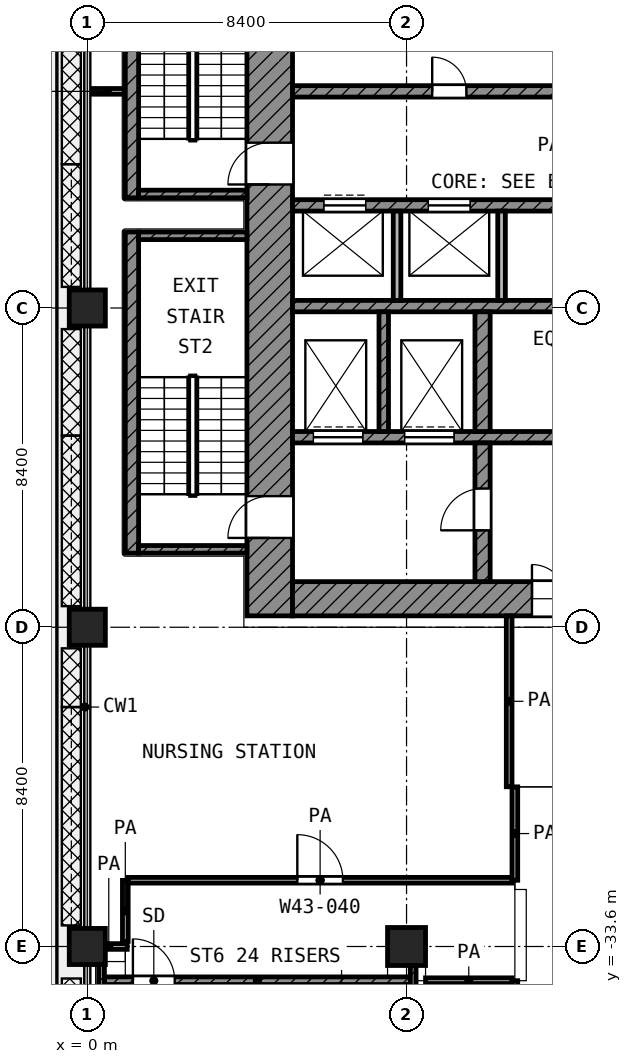
"""IFC4 building model, lengths in metres.
Left out: names, types, materials, properties, quantities, classifications, styles, units other than length and angle.
Written with IfcOpenShell. Run it as: python <this file> out.ifc"""

import sys

from ifc_helpers import new_model, si_unit, direction, frame, frame_2d, origin, origin_2d, place, context, subcontext, project, spatial, rectangle, extrude, element, fill, save


model = new_model("IFC4")
c1 = context("Model", 3, precision=1e-05, world=origin(), true_north=direction((0.0, 1.0)))
c2 = subcontext(c1, "Body", "Model", "MODEL_VIEW")
j1 = project(units=[si_unit("LENGTHUNIT", "METRE"), si_unit("PLANEANGLEUNIT", "RADIAN")], contexts=[c1])
p1 = place(None, origin())
s1 = spatial("IfcSite", under=j1, at=p1, CompositionType="ELEMENT")
p2 = place(p1, origin())
s2 = spatial("IfcBuilding", under=s1, at=p2, CompositionType="ELEMENT")
p3 = place(p2, frame((0.0, 0.0, 187.8)))
s3 = spatial("IfcBuildingStorey", under=s2, at=p3, CompositionType="ELEMENT", Elevation=187.8)
for number, where, z_axis, x_axis in (
    (1, (0.0, -16.8, 0.0), (0.0, 0.0, 1.0), (1.0, 0.0, 0.0)),
    (2, (0.0, -25.2, 0.0), (0.0, 0.0, 1.0), (1.0, 0.0, 0.0)),
    (3, (0.0, -33.6, 0.0), (0.0, 0.0, 1.0), (1.0, 0.0, 0.0)),
):
    element("IfcColumn", number, at=place(p3, frame(where, z_axis=z_axis, x_axis=x_axis)), inside=s3, PredefinedType="COLUMN", context=c2, shape_type="SweptSolid", body=[
        extrude(rectangle(XDim=0.95, YDim=0.95, at=origin_2d()), origin(), (0.0, 0.0, 1.0), 4.2),
    ])
p4 = place(p3, frame((8.4, -33.6, 0.0), z_axis=(0.0, 0.0, 1.0), x_axis=(1.0, 0.0, 0.0)))
e4 = element("IfcColumn", 4, at=p4, inside=s3, PredefinedType="COLUMN", context=c2, shape_type="SweptSolid", body=[
    extrude(rectangle(XDim=1.0, YDim=1.0, at=origin_2d()), origin(), (0.0, 0.0, 1.0), 4.2),
])
p5 = place(p3, frame((4.8, -24.9, 0.0), z_axis=(0.0, 0.0, 1.0), x_axis=(0.0, 1.0, 0.0)))
e5 = element("IfcWall", 5, at=p5, inside=s3, PredefinedType="SHEAR", context=c2, shape_type="SweptSolid", body=[
    extrude(rectangle(XDim=19.5, YDim=1.2, at=frame_2d((9.75, 0.0))), origin(), (0.0, 0.0, 1.0), 3.6),
])
p6 = place(p5, frame((11.35, 0.0, 0.0)))
e6 = element("IfcOpeningElement", 6, at=p6, cuts=e5, PredefinedType="OPENING", context=c2, shape_type="SweptSolid", body=[
    extrude(rectangle(XDim=1.1, YDim=2.1, at=frame_2d((0.55, 1.05))), frame((0.0, 0.61, 0.0), z_axis=(0.0, -1.0, 0.0), x_axis=(1.0, 0.0, 0.0)), (0.0, 0.0, 1.0), 1.22),
])
p7 = place(p5, frame((2.05, 0.0, 0.0)))
e7 = element("IfcOpeningElement", 7, at=p7, cuts=e5, PredefinedType="OPENING", context=c2, shape_type="SweptSolid", body=[
    extrude(rectangle(XDim=1.1, YDim=2.1, at=frame_2d((0.55, 1.05))), frame((0.0, 0.61, 0.0), z_axis=(0.0, -1.0, 0.0), x_axis=(1.0, 0.0, 0.0)), (0.0, 0.0, 1.0), 1.22),
])
p8 = place(p3, frame((5.4, -24.45, 0.0), z_axis=(0.0, 0.0, 1.0), x_axis=(1.0, 0.0, 0.0)))
e8 = element("IfcWall", 8, at=p8, inside=s3, PredefinedType="SHEAR", context=c2, shape_type="SweptSolid", body=[
    extrude(rectangle(XDim=18.6, YDim=0.9, at=frame_2d((9.3, 0.0))), origin(), (0.0, 0.0, 1.0), 3.6),
])
p9 = place(p8, frame((6.3, 0.0, 0.0)))
e9 = element("IfcOpeningElement", 9, at=p9, cuts=e8, PredefinedType="OPENING", context=c2, shape_type="SweptSolid", body=[
    extrude(rectangle(XDim=1.8, YDim=2.1, at=frame_2d((0.9, 1.05))), frame((0.0, 0.46, 0.0), z_axis=(0.0, -1.0, 0.0), x_axis=(1.0, 0.0, 0.0)), (0.0, 0.0, 1.0), 0.92),
])
p10 = place(p3, frame((5.4, -11.1, 0.0), z_axis=(0.0, 0.0, 1.0), x_axis=(1.0, 0.0, 0.0)))
e10 = element("IfcWall", 10, at=p10, inside=s3, PredefinedType="SHEAR", context=c2, shape_type="SweptSolid", body=[
    extrude(rectangle(XDim=16.65, YDim=0.3, at=frame_2d((8.325, 0.0))), origin(), (0.0, 0.0, 1.0), 3.6),
])
p11 = place(p10, frame((11.825, 0.0, 0.0)))
e11 = element("IfcOpeningElement", 11, at=p11, cuts=e10, PredefinedType="OPENING", context=c2, shape_type="SweptSolid", body=[
    extrude(rectangle(XDim=1.1, YDim=2.1, at=frame_2d((0.55, 1.05))), frame((0.0, 0.16, 0.0), z_axis=(0.0, -1.0, 0.0), x_axis=(1.0, 0.0, 0.0)), (0.0, 0.0, 1.0), 0.32),
])
p12 = place(p10, frame((14.575, 0.0, 0.0)))
e12 = element("IfcOpeningElement", 12, at=p12, cuts=e10, PredefinedType="OPENING", context=c2, shape_type="SweptSolid", body=[
    extrude(rectangle(XDim=1.1, YDim=2.1, at=frame_2d((0.55, 1.05))), frame((0.0, 0.16, 0.0), z_axis=(0.0, -1.0, 0.0), x_axis=(1.0, 0.0, 0.0)), (0.0, 0.0, 1.0), 0.32),
])
p13 = place(p10, frame((3.675, 0.0, 0.0)))
e13 = element("IfcOpeningElement", 13, at=p13, cuts=e10, PredefinedType="OPENING", context=c2, shape_type="SweptSolid", body=[
    extrude(rectangle(XDim=0.9, YDim=2.1, at=frame_2d((0.45, 1.05))), frame((0.0, 0.16, 0.0), z_axis=(0.0, -1.0, 0.0), x_axis=(1.0, 0.0, 0.0)), (0.0, 0.0, 1.0), 0.32),
])
p14 = place(p10, frame((9.175, 0.0, 0.0)))
e14 = element("IfcOpeningElement", 14, at=p14, cuts=e10, PredefinedType="OPENING", context=c2, shape_type="SweptSolid", body=[
    extrude(rectangle(XDim=0.9, YDim=2.1, at=frame_2d((0.45, 1.05))), frame((0.0, 0.16, 0.0), z_axis=(0.0, -1.0, 0.0), x_axis=(1.0, 0.0, 0.0)), (0.0, 0.0, 1.0), 0.32),
])
p15 = place(p3, frame((5.4, -14.1, 0.0), z_axis=(0.0, 0.0, 1.0), x_axis=(1.0, 0.0, 0.0)))
e15 = element("IfcWall", 15, at=p15, inside=s3, PredefinedType="SHEAR", context=c2, shape_type="SweptSolid", body=[
    extrude(rectangle(XDim=16.65, YDim=0.3, at=frame_2d((8.325, 0.0))), origin(), (0.0, 0.0, 1.0), 3.6),
])
p16 = place(p15, frame((0.825, 0.0, 0.0)))
e16 = element("IfcOpeningElement", 16, at=p16, cuts=e15, PredefinedType="OPENING", context=c2, shape_type="SweptSolid", body=[
    extrude(rectangle(XDim=1.1, YDim=2.1, at=frame_2d((0.55, 1.05))), frame((0.0, 0.16, 0.0), z_axis=(0.0, -1.0, 0.0), x_axis=(1.0, 0.0, 0.0)), (0.0, 0.0, 1.0), 0.32),
])
p17 = place(p15, frame((3.575, 0.0, 0.0)))
e17 = element("IfcOpeningElement", 17, at=p17, cuts=e15, PredefinedType="OPENING", context=c2, shape_type="SweptSolid", body=[
    extrude(rectangle(XDim=1.1, YDim=2.1, at=frame_2d((0.55, 1.05))), frame((0.0, 0.16, 0.0), z_axis=(0.0, -1.0, 0.0), x_axis=(1.0, 0.0, 0.0)), (0.0, 0.0, 1.0), 0.32),
])
p18 = place(p3, frame((5.4, -16.75, 0.0), z_axis=(0.0, 0.0, 1.0), x_axis=(1.0, 0.0, 0.0)))
e18 = element("IfcWall", 18, at=p18, inside=s3, PredefinedType="SHEAR", context=c2, shape_type="SweptSolid", body=[
    extrude(rectangle(XDim=16.65, YDim=0.3, at=frame_2d((8.325, 0.0))), origin(), (0.0, 0.0, 1.0), 3.6),
])
p19 = place(p3, frame((5.4, -20.2, 0.0), z_axis=(0.0, 0.0, 1.0), x_axis=(1.0, 0.0, 0.0)))
e19 = element("IfcWall", 19, at=p19, inside=s3, PredefinedType="SHEAR", context=c2, shape_type="SweptSolid", body=[
    extrude(rectangle(XDim=14.65, YDim=0.3, at=frame_2d((7.325, 0.0))), origin(), (0.0, 0.0, 1.0), 3.6),
])
p20 = place(p19, frame((10.55, 0.0, 0.0)))
e20 = element("IfcOpeningElement", 20, at=p20, cuts=e19, PredefinedType="OPENING", context=c2, shape_type="SweptSolid", body=[
    extrude(rectangle(XDim=1.3, YDim=2.1, at=frame_2d((0.65, 1.05))), frame((0.0, 0.16, 0.0), z_axis=(0.0, -1.0, 0.0), x_axis=(1.0, 0.0, 0.0)), (0.0, 0.0, 1.0), 0.32),
])
p21 = place(p19, frame((12.95, 0.0, 0.0)))
e21 = element("IfcOpeningElement", 21, at=p21, cuts=e19, PredefinedType="OPENING", context=c2, shape_type="SweptSolid", body=[
    extrude(rectangle(XDim=1.3, YDim=2.1, at=frame_2d((0.65, 1.05))), frame((0.0, 0.16, 0.0), z_axis=(0.0, -1.0, 0.0), x_axis=(1.0, 0.0, 0.0)), (0.0, 0.0, 1.0), 0.32),
])
p22 = place(p19, frame((0.55, 0.0, 0.0)))
e22 = element("IfcOpeningElement", 22, at=p22, cuts=e19, PredefinedType="OPENING", context=c2, shape_type="SweptSolid", body=[
    extrude(rectangle(XDim=1.3, YDim=2.1, at=frame_2d((0.65, 1.05))), frame((0.0, 0.16, 0.0), z_axis=(0.0, -1.0, 0.0), x_axis=(1.0, 0.0, 0.0)), (0.0, 0.0, 1.0), 0.32),
])
p23 = place(p19, frame((2.95, 0.0, 0.0)))
e23 = element("IfcOpeningElement", 23, at=p23, cuts=e19, PredefinedType="OPENING", context=c2, shape_type="SweptSolid", body=[
    extrude(rectangle(XDim=1.3, YDim=2.1, at=frame_2d((0.65, 1.05))), frame((0.0, 0.16, 0.0), z_axis=(0.0, -1.0, 0.0), x_axis=(1.0, 0.0, 0.0)), (0.0, 0.0, 1.0), 0.32),
])
p24 = place(p19, frame((7.15, 0.0, 0.0)))
e24 = element("IfcOpeningElement", 24, at=p24, cuts=e19, PredefinedType="OPENING", context=c2, shape_type="SweptSolid", body=[
    extrude(rectangle(XDim=0.9, YDim=2.1, at=frame_2d((0.45, 1.05))), frame((0.0, 0.16, 0.0), z_axis=(0.0, -1.0, 0.0), x_axis=(1.0, 0.0, 0.0)), (0.0, 0.0, 1.0), 0.32),
])
p25 = place(p3, frame((10.4, -24.0, 0.0), z_axis=(0.0, 0.0, 1.0), x_axis=(0.0, 1.0, 0.0)))
e25 = element("IfcWall", 25, at=p25, inside=s3, PredefinedType="SHEAR", context=c2, shape_type="SweptSolid", body=[
    extrude(rectangle(XDim=3.65, YDim=0.4, at=frame_2d((1.825, 0.0))), origin(), (0.0, 0.0, 1.0), 3.6),
])
p26 = place(p25, frame((1.35, 0.0, 0.0)))
e26 = element("IfcOpeningElement", 26, at=p26, cuts=e25, PredefinedType="OPENING", context=c2, shape_type="SweptSolid", body=[
    extrude(rectangle(XDim=1.1, YDim=2.1, at=frame_2d((0.55, 1.05))), frame((0.0, 0.21, 0.0), z_axis=(0.0, -1.0, 0.0), x_axis=(1.0, 0.0, 0.0)), (0.0, 0.0, 1.0), 0.42),
])
p27 = place(p3, frame((10.4, -20.05, 0.0), z_axis=(0.0, 0.0, 1.0), x_axis=(0.0, 1.0, 0.0)))
e27 = element("IfcWall", 27, at=p27, inside=s3, PredefinedType="SHEAR", context=c2, shape_type="SweptSolid", body=[
    extrude(rectangle(XDim=3.15, YDim=0.4, at=frame_2d((1.575, 0.0))), origin(), (0.0, 0.0, 1.0), 3.6),
])
p28 = place(p3, frame((7.8, -20.05, 0.0), z_axis=(0.0, 0.0, 1.0), x_axis=(0.0, 1.0, 0.0)))
e28 = element("IfcWall", 28, at=p28, inside=s3, PredefinedType="SHEAR", context=c2, shape_type="SweptSolid", body=[
    extrude(rectangle(XDim=3.15, YDim=0.25, at=frame_2d((1.575, 0.0))), origin(), (0.0, 0.0, 1.0), 3.6),
])
for number, where, z_axis, x_axis in (
    (29, (8.15, -16.6, 0.0), (0.0, 0.0, 1.0), (0.0, 1.0, 0.0)),
    (30, (10.9, -16.6, 0.0), (0.0, 0.0, 1.0), (0.0, 1.0, 0.0)),
):
    element("IfcWall", number, at=place(p3, frame(where, z_axis=z_axis, x_axis=x_axis)), inside=s3, PredefinedType="PARTITIONING", context=c2, shape_type="SweptSolid", body=[
        extrude(rectangle(XDim=2.35, YDim=0.2, at=frame_2d((1.175, 0.0))), origin(), (0.0, 0.0, 1.0), 3.6),
    ])
p29 = place(p3, frame((1.175, -13.9, 0.0), z_axis=(0.0, 0.0, 1.0), x_axis=(0.0, 1.0, 0.0)))
e31 = element("IfcWall", 31, at=p29, inside=s3, PredefinedType="SHEAR", context=c2, shape_type="SweptSolid", body=[
    extrude(rectangle(XDim=8.45, YDim=0.35, at=frame_2d((4.225, 0.0))), origin(), (0.0, 0.0, 1.0), 3.6),
])
p30 = place(p3, frame((1.35, -13.8, 0.0), z_axis=(0.0, 0.0, 1.0), x_axis=(1.0, 0.0, 0.0)))
e32 = element("IfcWall", 32, at=p30, inside=s3, PredefinedType="SHEAR", context=c2, shape_type="SweptSolid", body=[
    extrude(rectangle(XDim=2.85, YDim=0.2, at=frame_2d((1.425, 0.0))), origin(), (0.0, 0.0, 1.0), 3.6),
])
p31 = place(p3, frame((1.175, -23.25, 0.0), z_axis=(0.0, 0.0, 1.0), x_axis=(0.0, 1.0, 0.0)))
e33 = element("IfcWall", 33, at=p31, inside=s3, PredefinedType="SHEAR", context=c2, shape_type="SweptSolid", body=[
    extrude(rectangle(XDim=8.45, YDim=0.35, at=frame_2d((4.225, 0.0))), origin(), (0.0, 0.0, 1.0), 3.6),
])
for number, where, z_axis, x_axis in (
    (34, (1.35, -14.9, 0.0), (0.0, 0.0, 1.0), (1.0, 0.0, 0.0)),
    (35, (1.35, -23.15, 0.0), (0.0, 0.0, 1.0), (1.0, 0.0, 0.0)),
):
    element("IfcWall", number, at=place(p3, frame(where, z_axis=z_axis, x_axis=x_axis)), inside=s3, PredefinedType="SHEAR", context=c2, shape_type="SweptSolid", body=[
        extrude(rectangle(XDim=2.85, YDim=0.2, at=frame_2d((1.425, 0.0))), origin(), (0.0, 0.0, 1.0), 3.6),
    ])
p32 = place(p3, frame((0.375, -40.05, 0.0), z_axis=(0.0, 0.0, 1.0), x_axis=(0.0, 1.0, 0.0)))
e36 = element("IfcWall", 36, at=p32, inside=s3, PredefinedType="SHEAR", context=c2, shape_type="SweptSolid", body=[
    extrude(rectangle(XDim=5.975, YDim=0.15, at=frame_2d((2.988, 0.0))), origin(), (0.0, 0.0, 1.0), 3.6),
])
p33 = place(p3, frame((8.575, -40.05, 0.0), z_axis=(0.0, 0.0, 1.0), x_axis=(0.0, 1.0, 0.0)))
e37 = element("IfcWall", 37, at=p33, inside=s3, PredefinedType="SHEAR", context=c2, shape_type="SweptSolid", body=[
    extrude(rectangle(XDim=5.95, YDim=0.15, at=frame_2d((2.975, 0.0))), origin(), (0.0, 0.0, 1.0), 3.6),
])
p34 = place(p3, frame((0.45, -34.5, 0.0), z_axis=(0.0, 0.0, 1.0), x_axis=(1.0, 0.0, 0.0)))
e38 = element("IfcWall", 38, at=p34, inside=s3, PredefinedType="SHEAR", context=c2, shape_type="SweptSolid", body=[
    extrude(rectangle(XDim=8.05, YDim=0.2, at=frame_2d((4.025, 0.0))), origin(), (0.0, 0.0, 1.0), 3.6),
])
p35 = place(p34, frame((0.75, 0.0, 0.0)))
e39 = element("IfcOpeningElement", 39, at=p35, cuts=e38, PredefinedType="OPENING", context=c2, shape_type="SweptSolid", body=[
    extrude(rectangle(XDim=1.1, YDim=2.1, at=frame_2d((0.55, 1.05))), frame((0.0, 0.11, 0.0), z_axis=(0.0, -1.0, 0.0), x_axis=(1.0, 0.0, 0.0)), (0.0, 0.0, 1.0), 0.22),
])
p36 = place(p3, frame((8.9, -34.5, 0.0), z_axis=(0.0, 0.0, 1.0), x_axis=(1.0, 0.0, 0.0)))
e40 = element("IfcWall", 40, at=p36, inside=s3, PredefinedType="PARTITIONING", context=c2, shape_type="SweptSolid", body=[
    extrude(rectangle(XDim=2.275, YDim=0.15, at=frame_2d((1.138, 0.0))), origin(), (0.0, 0.0, 1.0), 3.6),
])
p37 = place(p3, frame((0.08, -33.6, 0.0), z_axis=(0.0, 0.0, 1.0), x_axis=(1.0, 0.0, 0.0)))
e41 = element("IfcWall", 41, at=p37, inside=s3, PredefinedType="PARTITIONING", context=c2, shape_type="SweptSolid", body=[
    extrude(rectangle(XDim=0.97, YDim=0.15, at=frame_2d((0.485, 0.0))), origin(), (0.0, 0.0, 1.0), 3.6),
])
p38 = place(p3, frame((1.077, -31.857, 0.0), z_axis=(0.0, 0.0, 1.0), x_axis=(1.0, 0.0, 0.0)))
e42 = element("IfcWall", 42, at=p38, inside=s3, PredefinedType="PARTITIONING", context=c2, shape_type="SweptSolid", body=[
    extrude(rectangle(XDim=10.098, YDim=0.15, at=frame_2d((5.049, 0.0))), origin(), (0.0, 0.0, 1.0), 3.6),
])
p39 = place(p38, frame((4.449, 0.0, 0.0)))
e43 = element("IfcOpeningElement", 43, at=p39, cuts=e42, PredefinedType="OPENING", context=c2, shape_type="SweptSolid", body=[
    extrude(rectangle(XDim=1.2, YDim=2.1, at=frame_2d((0.6, 1.05))), frame((0.0, 0.085, 0.0), z_axis=(0.0, -1.0, 0.0), x_axis=(1.0, 0.0, 0.0)), (0.0, 0.0, 1.0), 0.17),
])
p40 = place(p3, frame((0.08, -11.1, 0.0), z_axis=(0.0, 0.0, 1.0), x_axis=(1.0, 0.0, 0.0)))
e44 = element("IfcWall", 44, at=p40, inside=s3, PredefinedType="PARTITIONING", context=c2, shape_type="SweptSolid", body=[
    extrude(rectangle(XDim=0.89, YDim=0.15, at=frame_2d((0.445, 0.0))), origin(), (0.0, 0.0, 1.0), 3.6),
])
p41 = place(p3, frame((1.0, -33.465, 0.0), z_axis=(0.0, 0.0, 1.0), x_axis=(0.0, 1.0, 0.0)))
e45 = element("IfcWall", 45, at=p41, inside=s3, PredefinedType="PARTITIONING", context=c2, shape_type="SweptSolid", body=[
    extrude(rectangle(XDim=1.605, YDim=0.15, at=frame_2d((0.802, 0.0))), origin(), (0.0, 0.0, 1.0), 3.6),
])
p42 = place(p3, frame((11.1, -29.397, 0.0), z_axis=(0.0, 0.0, 1.0), x_axis=(0.0, 1.0, 0.0)))
e46 = element("IfcWall", 46, at=p42, inside=s3, PredefinedType="PARTITIONING", context=c2, shape_type="SweptSolid", body=[
    extrude(rectangle(XDim=4.497, YDim=0.15, at=frame_2d((2.249, 0.0))), origin(), (0.0, 0.0, 1.0), 3.6),
])
p43 = place(p3, frame((11.25, -39.95, 0.0), z_axis=(0.0, 0.0, 1.0), x_axis=(0.0, 1.0, 0.0)))
e47 = element("IfcWall", 47, at=p43, inside=s3, PredefinedType="PARTITIONING", context=c2, shape_type="SweptSolid", body=[
    extrude(rectangle(XDim=5.45, YDim=0.15, at=frame_2d((2.725, 0.0))), origin(), (0.0, 0.0, 1.0), 3.6),
])
p44 = place(p43, frame((2.225, 0.0, 0.0)))
e48 = element("IfcOpeningElement", 48, at=p44, cuts=e47, PredefinedType="OPENING", context=c2, shape_type="SweptSolid", body=[
    extrude(rectangle(XDim=1.0, YDim=2.1, at=frame_2d((0.5, 1.05))), frame((0.0, 0.085, 0.0), z_axis=(0.0, -1.0, 0.0), x_axis=(1.0, 0.0, 0.0)), (0.0, 0.0, 1.0), 0.17),
])
p45 = place(p3, frame((11.25, -31.857, 0.0), z_axis=(0.0, 0.0, 1.0), x_axis=(0.0, 1.0, 0.0)))
e49 = element("IfcWall", 49, at=p45, inside=s3, PredefinedType="PARTITIONING", context=c2, shape_type="SweptSolid", body=[
    extrude(rectangle(XDim=2.457, YDim=0.15, at=frame_2d((1.229, 0.0))), origin(), (0.0, 0.0, 1.0), 3.6),
])
p46 = place(p16, origin())
e50 = element("IfcDoor", 50, at=p46, inside=s3, OperationType="DOUBLE_DOOR_SLIDING", PredefinedType="DOOR", context=c2, shape_type="SweptSolid", body=[
    extrude(rectangle(XDim=1.1, YDim=2.1, at=frame_2d((0.55, 1.05))), frame((0.0, 0.025, 0.0), z_axis=(0.0, -1.0, 0.0), x_axis=(1.0, 0.0, 0.0)), (0.0, 0.0, 1.0), 0.05),
])
fill(e16, e50)
p47 = place(p17, origin())
e51 = element("IfcDoor", 51, at=p47, inside=s3, OperationType="DOUBLE_DOOR_SLIDING", PredefinedType="DOOR", context=c2, shape_type="SweptSolid", body=[
    extrude(rectangle(XDim=1.1, YDim=2.1, at=frame_2d((0.55, 1.05))), frame((0.0, 0.025, 0.0), z_axis=(0.0, -1.0, 0.0), x_axis=(1.0, 0.0, 0.0)), (0.0, 0.0, 1.0), 0.05),
])
fill(e17, e51)
p48 = place(p22, origin())
e52 = element("IfcDoor", 52, at=p48, inside=s3, OperationType="DOUBLE_DOOR_SLIDING", PredefinedType="DOOR", context=c2, shape_type="SweptSolid", body=[
    extrude(rectangle(XDim=1.3, YDim=2.1, at=frame_2d((0.65, 1.05))), frame((0.0, 0.025, 0.0), z_axis=(0.0, -1.0, 0.0), x_axis=(1.0, 0.0, 0.0)), (0.0, 0.0, 1.0), 0.05),
])
fill(e22, e52)
p49 = place(p23, origin())
e53 = element("IfcDoor", 53, at=p49, inside=s3, OperationType="DOUBLE_DOOR_SLIDING", PredefinedType="DOOR", context=c2, shape_type="SweptSolid", body=[
    extrude(rectangle(XDim=1.3, YDim=2.1, at=frame_2d((0.65, 1.05))), frame((0.0, 0.025, 0.0), z_axis=(0.0, -1.0, 0.0), x_axis=(1.0, 0.0, 0.0)), (0.0, 0.0, 1.0), 0.05),
])
fill(e23, e53)
p50 = place(p6, origin())
e54 = element("IfcDoor", 54, at=p50, inside=s3, OperationType="SINGLE_SWING_LEFT", PredefinedType="DOOR", context=c2, shape_type="SweptSolid", body=[
    extrude(rectangle(XDim=1.1, YDim=2.1, at=frame_2d((0.55, 1.05))), frame((0.0, 0.025, 0.0), z_axis=(0.0, -1.0, 0.0), x_axis=(1.0, 0.0, 0.0)), (0.0, 0.0, 1.0), 0.05),
])
fill(e6, e54)
p51 = place(p7, origin())
e55 = element("IfcDoor", 55, at=p51, inside=s3, OperationType="SINGLE_SWING_LEFT", PredefinedType="DOOR", context=c2, shape_type="SweptSolid", body=[
    extrude(rectangle(XDim=1.1, YDim=2.1, at=frame_2d((0.55, 1.05))), frame((0.0, 0.025, 0.0), z_axis=(0.0, -1.0, 0.0), x_axis=(1.0, 0.0, 0.0)), (0.0, 0.0, 1.0), 0.05),
])
fill(e7, e55)
p52 = place(p26, origin())
e56 = element("IfcDoor", 56, at=p52, inside=s3, OperationType="SINGLE_SWING_LEFT", PredefinedType="DOOR", context=c2, shape_type="SweptSolid", body=[
    extrude(rectangle(XDim=1.1, YDim=2.1, at=frame_2d((0.55, 1.05))), frame((0.0, 0.025, 0.0), z_axis=(0.0, -1.0, 0.0), x_axis=(1.0, 0.0, 0.0)), (0.0, 0.0, 1.0), 0.05),
])
fill(e26, e56)
p53 = place(p9, origin())
e57 = element("IfcDoor", 57, at=p53, inside=s3, OperationType="DOUBLE_DOOR_SINGLE_SWING", PredefinedType="DOOR", context=c2, shape_type="SweptSolid", body=[
    extrude(rectangle(XDim=1.8, YDim=2.1, at=frame_2d((0.9, 1.05))), frame((0.0, 0.025, 0.0), z_axis=(0.0, -1.0, 0.0), x_axis=(1.0, 0.0, 0.0)), (0.0, 0.0, 1.0), 0.05),
])
fill(e9, e57)
p54 = place(p13, origin())
e58 = element("IfcDoor", 58, at=p54, inside=s3, OperationType="SINGLE_SWING_LEFT", PredefinedType="DOOR", context=c2, shape_type="SweptSolid", body=[
    extrude(rectangle(XDim=0.9, YDim=2.1, at=frame_2d((0.45, 1.05))), frame((0.0, 0.025, 0.0), z_axis=(0.0, -1.0, 0.0), x_axis=(1.0, 0.0, 0.0)), (0.0, 0.0, 1.0), 0.05),
])
fill(e13, e58)
p55 = place(p35, origin())
e59 = element("IfcDoor", 59, at=p55, inside=s3, OperationType="SINGLE_SWING_LEFT", PredefinedType="DOOR", context=c2, shape_type="SweptSolid", body=[
    extrude(rectangle(XDim=1.1, YDim=2.1, at=frame_2d((0.55, 1.05))), frame((0.0, 0.025, 0.0), z_axis=(0.0, -1.0, 0.0), x_axis=(1.0, 0.0, 0.0)), (0.0, 0.0, 1.0), 0.05),
])
fill(e39, e59)
p56 = place(p39, origin())
e60 = element("IfcDoor", 60, at=p56, inside=s3, OperationType="SINGLE_SWING_LEFT", PredefinedType="DOOR", context=c2, shape_type="SweptSolid", body=[
    extrude(rectangle(XDim=1.2, YDim=2.1, at=frame_2d((0.6, 1.05))), frame((0.0, 0.025, 0.0), z_axis=(0.0, -1.0, 0.0), x_axis=(1.0, 0.0, 0.0)), (0.0, 0.0, 1.0), 0.05),
])
fill(e43, e60)
save(model, sys.argv[1])
